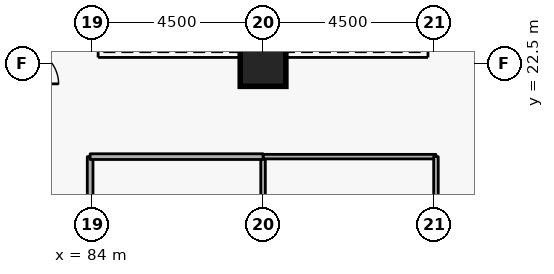
"""IFC4 building model, lengths in metres.
Left out: names, types, materials, properties, quantities, classifications, styles, units other than length and angle.
Written with IfcOpenShell. Run it as: python <this file> out.ifc"""

import sys

from ifc_helpers import new_model, si_unit, direction, frame, frame_2d, origin, origin_2d, place, context, subcontext, project, spatial, rectangle, extrude, element, save


model = new_model("IFC4")
c1 = context("Model", 3, precision=1e-05, world=origin(), true_north=direction((0.0, 1.0)))
c2 = subcontext(c1, "Body", "Model", "MODEL_VIEW")
j1 = project(units=[si_unit("LENGTHUNIT", "METRE"), si_unit("PLANEANGLEUNIT", "RADIAN")], contexts=[c1])
p1 = place(None, origin())
s1 = spatial("IfcSite", under=j1, at=p1, CompositionType="ELEMENT")
p2 = place(p1, origin())
s2 = spatial("IfcBuilding", under=s1, at=p2, CompositionType="ELEMENT")
p3 = place(p2, frame((0.0, 0.0, 123.3)))
s3 = spatial("IfcBuildingStorey", under=s2, at=p3, CompositionType="ELEMENT", Elevation=123.3)
p4 = place(p3, frame((88.5, 22.5, 0.0), z_axis=(0.0, 0.0, 1.0), x_axis=(1.0, 0.0, 0.0)))
e1 = element("IfcColumn", 1, at=p4, inside=s3, PredefinedType="COLUMN", context=c2, shape_type="SweptSolid", body=[
    extrude(rectangle(XDim=1.2, YDim=1.2, at=origin_2d()), origin(), (0.0, 0.0, 1.0), 3.6),
])
p5 = place(p3, frame((88.5, 3.28, 0.0), z_axis=(0.0, 0.0, 1.0), x_axis=(0.0, 1.0, 0.0)))
e2 = element("IfcWall", 2, at=p5, inside=s3, PredefinedType="PARTITIONING", context=c2, shape_type="SweptSolid", body=[
    extrude(rectangle(XDim=16.77, YDim=0.12, at=frame_2d((8.385, 0.0))), origin(), (0.0, 0.0, 1.0), 2.932),
])
p6 = place(p3, frame((88.5, 20.05, 0.0), z_axis=(0.0, 0.0, 1.0), x_axis=(1.0, 0.0, 0.0)))
e3 = element("IfcWall", 3, at=p6, inside=s3, PredefinedType="PARTITIONING", context=c2, shape_type="SweptSolid", body=[
    extrude(rectangle(XDim=4.55, YDim=0.12, at=frame_2d((2.275, 0.0))), origin(), (0.0, 0.0, 1.0), 3.34),
])
p7 = place(p3, frame((93.05, 20.05, 0.0), z_axis=(0.0, 0.0, 1.0), x_axis=(0.0, -1.0, 0.0)))
e4 = element("IfcWall", 4, at=p7, inside=s3, PredefinedType="PARTITIONING", context=c2, shape_type="SweptSolid", body=[
    extrude(rectangle(XDim=5.3, YDim=0.12, at=frame_2d((2.65, 0.0))), origin(), (0.0, 0.0, 1.0), 3.34),
])
p8 = place(p7, frame((2.125, 0.0, 0.0)))
e5 = element("IfcOpeningElement", 5, at=p8, cuts=e4, PredefinedType="OPENING", context=c2, shape_type="SweptSolid", body=[
    extrude(rectangle(XDim=1.05, YDim=2.1, at=frame_2d((0.525, 1.05))), frame((0.0, 0.07, 0.0), z_axis=(0.0, -1.0, 0.0), x_axis=(1.0, 0.0, 0.0)), (0.0, 0.0, 1.0), 0.14),
])
p9 = place(p3, frame((83.95, 14.75, 0.0), z_axis=(0.0, 0.0, 1.0), x_axis=(0.0, 1.0, 0.0)))
e6 = element("IfcWall", 6, at=p9, inside=s3, PredefinedType="PARTITIONING", context=c2, shape_type="SweptSolid", body=[
    extrude(rectangle(XDim=5.3, YDim=0.15, at=frame_2d((2.65, 0.0))), origin(), (0.0, 0.0, 1.0), 3.34),
])
p10 = place(p9, frame((2.0, 0.0, 0.0)))
e7 = element("IfcOpeningElement", 7, at=p10, cuts=e6, PredefinedType="OPENING", context=c2, shape_type="SweptSolid", body=[
    extrude(rectangle(XDim=1.3, YDim=2.12, at=frame_2d((0.65, 1.06))), frame((0.0, 0.085, 0.0), z_axis=(0.0, -1.0, 0.0), x_axis=(1.0, 0.0, 0.0)), (0.0, 0.0, 1.0), 0.17),
])
p11 = place(p3, frame((83.95, 20.05, 0.0), z_axis=(0.0, 0.0, 1.0), x_axis=(1.0, 0.0, 0.0)))
e8 = element("IfcWall", 8, at=p11, inside=s3, PredefinedType="PARTITIONING", context=c2, shape_type="SweptSolid", body=[
    extrude(rectangle(XDim=4.55, YDim=0.15, at=frame_2d((2.275, 0.0))), origin(), (0.0, 0.0, 1.0), 3.34),
])
save(model, sys.argv[1])
